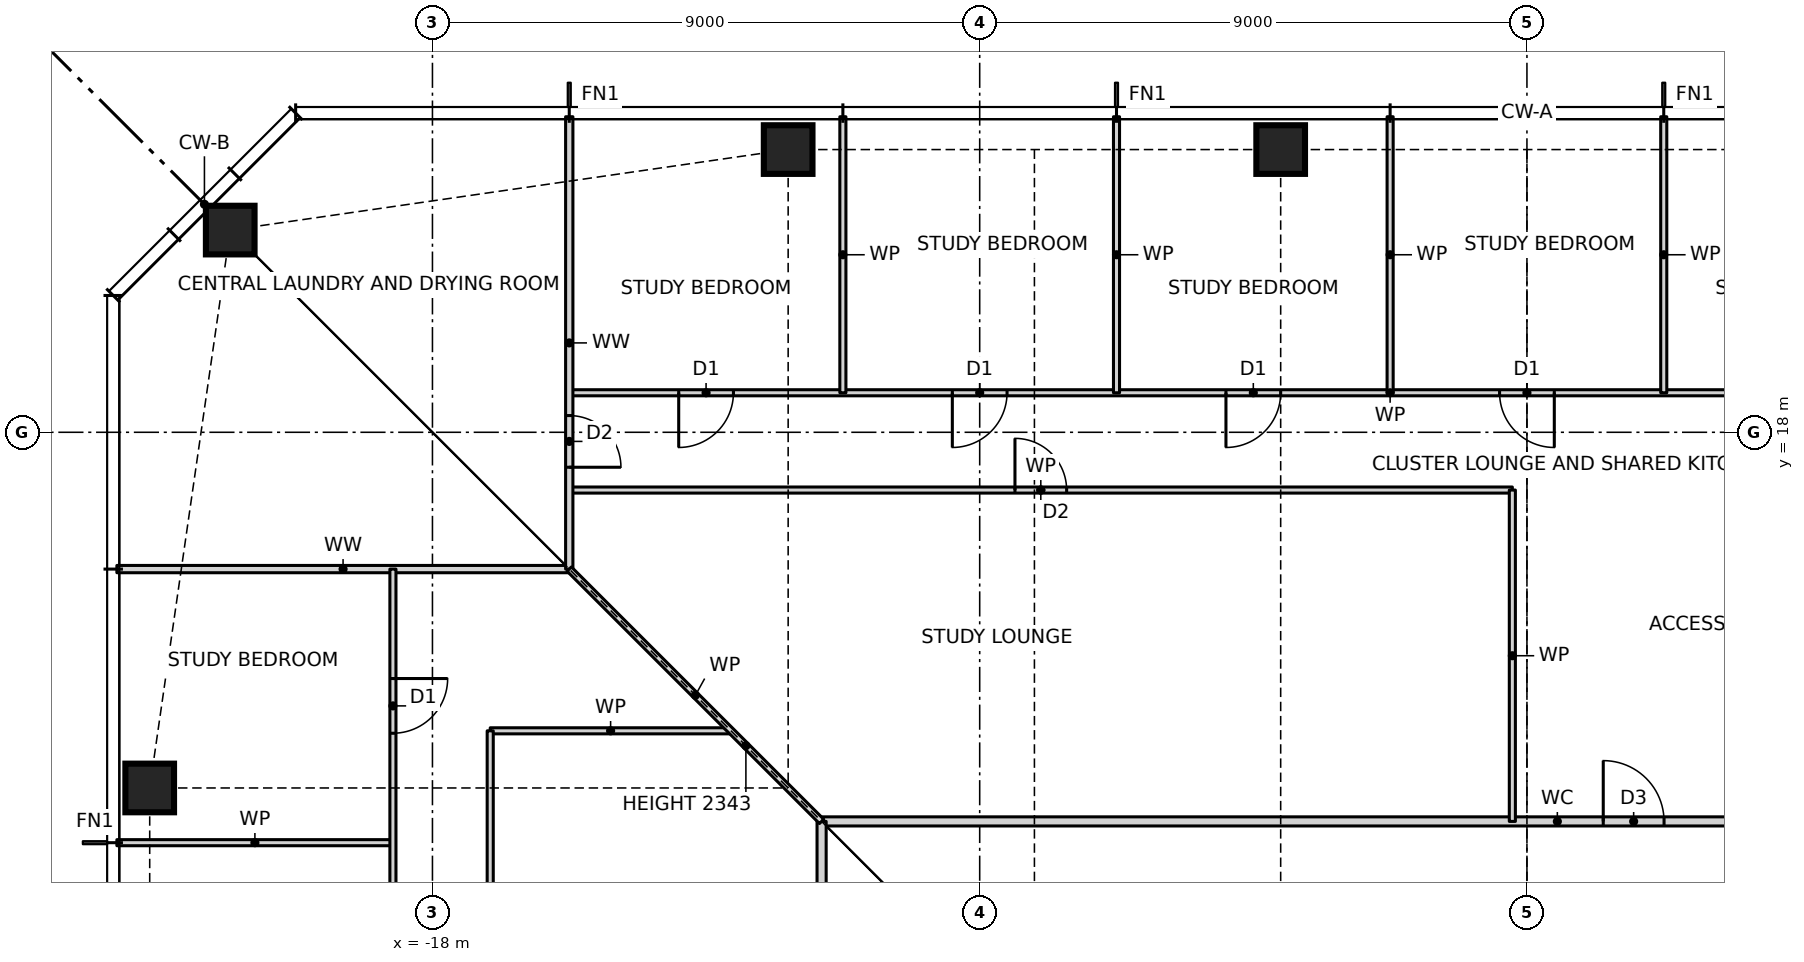
"""IFC4 building model, lengths in metres.
Left out: names, types, materials, properties, quantities, classifications, styles, units other than length and angle.
Written with IfcOpenShell. Run it as: python <this file> out.ifc"""

import sys

from ifc_helpers import new_model, si_unit, direction, frame, frame_2d, origin, origin_2d, place, context, subcontext, project, spatial, rectangle, hollow_rectangle, extrude, element, fill, save


model = new_model("IFC4")
c1 = context("Model", 3, precision=1e-05, world=origin(), true_north=direction((0.0, 1.0)))
c2 = subcontext(c1, "Body", "Model", "MODEL_VIEW")
j1 = project(units=[si_unit("LENGTHUNIT", "METRE"), si_unit("PLANEANGLEUNIT", "RADIAN")], contexts=[c1])
p1 = place(None, origin())
s1 = spatial("IfcSite", under=j1, at=p1, CompositionType="ELEMENT")
p2 = place(p1, origin())
s2 = spatial("IfcBuilding", under=s1, at=p2, CompositionType="ELEMENT")
p3 = place(p2, frame((0.0, 0.0, 32.5)))
s3 = spatial("IfcBuildingStorey", under=s2, at=p3, CompositionType="ELEMENT", Elevation=32.5)
for number, where, z_axis, x_axis in (
    (1, (-4.05, 22.65, 0.0), (0.0, 0.0, 1.0), (1.0, 0.0, 0.0)),
    (2, (-12.15, 22.65, 0.0), (0.0, 0.0, 1.0), (1.0, 0.0, 0.0)),
    (3, (-21.326, 21.326, 0.0), (0.0, 0.0, 1.0), (1.0, 0.0, 0.0)),
    (4, (-22.65, 12.15, 0.0), (0.0, 0.0, 1.0), (1.0, 0.0, 0.0)),
):
    element("IfcColumn", number, at=place(p3, frame(where, z_axis=z_axis, x_axis=x_axis)), inside=s3, PredefinedType="COLUMN", context=c2, shape_type="SweptSolid", body=[
        extrude(hollow_rectangle(XDim=0.8, YDim=0.8, WallThickness=0.09, at=origin_2d()), origin(), (0.0, 0.0, 1.0), 3.5),
    ])
p4 = place(p3, frame((-23.19, 11.25, 0.0), z_axis=(0.0, 0.0, 1.0), x_axis=(1.0, 0.0, 0.0)))
e5 = element("IfcWall", 5, at=p4, inside=s3, PredefinedType="PARTITIONING", context=c2, shape_type="SweptSolid", body=[
    extrude(rectangle(XDim=4.54, YDim=0.1, at=frame_2d((2.27, 0.0))), origin(), (0.0, 0.0, 1.0), 3.27),
])
p5 = place(p3, frame((-11.6, 11.6, 0.0), z_axis=(0.0, 0.0, 1.0), x_axis=(1.0, 0.0, 0.0)))
e6 = element("IfcWall", 6, at=p5, inside=s3, PredefinedType="PARTITIONING", context=c2, shape_type="SweptSolid", body=[
    extrude(rectangle(XDim=24.2, YDim=0.15, at=frame_2d((12.1, 0.0))), origin(), (0.0, 0.0, 1.0), 3.27),
])
p6 = place(p5, frame((12.855, 0.0, 0.0)))
e7 = element("IfcOpeningElement", 7, at=p6, cuts=e6, PredefinedType="OPENING", context=c2, shape_type="SweptSolid", body=[
    extrude(rectangle(XDim=1.0, YDim=2.1, at=frame_2d((0.5, 1.05))), frame((0.0, 0.085, 0.0), z_axis=(0.0, -1.0, 0.0), x_axis=(1.0, 0.0, 0.0)), (0.0, 0.0, 1.0), 0.17),
])
p7 = place(p3, frame((-17.05, 13.09, 0.0), z_axis=(0.0, 0.0, 1.0), x_axis=(1.0, 0.0, 0.0)))
e8 = element("IfcWall", 8, at=p7, inside=s3, PredefinedType="PARTITIONING", context=c2, shape_type="SweptSolid", body=[
    extrude(rectangle(XDim=3.96, YDim=0.1, at=frame_2d((1.98, 0.0))), origin(), (0.0, 0.0, 1.0), 3.27),
])
p8 = place(p3, frame((-23.19, 15.75, 0.0), z_axis=(0.0, 0.0, 1.0), x_axis=(1.0, 0.0, 0.0)))
e9 = element("IfcWall", 9, at=p8, inside=s3, PredefinedType="PARTITIONING", context=c2, shape_type="SweptSolid", body=[
    extrude(rectangle(XDim=7.44, YDim=0.12, at=frame_2d((3.72, 0.0))), origin(), (0.0, 0.0, 1.0), 3.27),
])
p9 = place(p3, frame((-15.75, 17.05, 0.0), z_axis=(0.0, 0.0, 1.0), x_axis=(1.0, 0.0, 0.0)))
e10 = element("IfcWall", 10, at=p9, inside=s3, PredefinedType="PARTITIONING", context=c2, shape_type="SweptSolid", body=[
    extrude(rectangle(XDim=15.51, YDim=0.1, at=frame_2d((7.755, 0.0))), origin(), (0.0, 0.0, 1.0), 3.27),
])
p10 = place(p9, frame((7.33, 0.0, 0.0)))
e11 = element("IfcOpeningElement", 11, at=p10, cuts=e10, PredefinedType="OPENING", context=c2, shape_type="SweptSolid", body=[
    extrude(rectangle(XDim=0.85, YDim=2.1, at=frame_2d((0.425, 1.05))), frame((0.0, 0.06, 0.0), z_axis=(0.0, -1.0, 0.0), x_axis=(1.0, 0.0, 0.0)), (0.0, 0.0, 1.0), 0.12),
])
p11 = place(p3, frame((-15.75, 18.65, 0.0), z_axis=(0.0, 0.0, 1.0), x_axis=(1.0, 0.0, 0.0)))
e12 = element("IfcWall", 12, at=p11, inside=s3, PredefinedType="PARTITIONING", context=c2, shape_type="SweptSolid", body=[
    extrude(rectangle(XDim=27.0, YDim=0.1, at=frame_2d((13.5, 0.0))), origin(), (0.0, 0.0, 1.0), 3.27),
])
p12 = place(p11, frame((24.3, 0.0, 0.0)))
e13 = element("IfcOpeningElement", 13, at=p12, cuts=e12, PredefinedType="OPENING", context=c2, shape_type="SweptSolid", body=[
    extrude(rectangle(XDim=0.9, YDim=2.1, at=frame_2d((0.45, 1.05))), frame((0.0, 0.06, 0.0), z_axis=(0.0, -1.0, 0.0), x_axis=(1.0, 0.0, 0.0)), (0.0, 0.0, 1.0), 0.12),
])
p13 = place(p11, frame((19.8, 0.0, 0.0)))
e14 = element("IfcOpeningElement", 14, at=p13, cuts=e12, PredefinedType="OPENING", context=c2, shape_type="SweptSolid", body=[
    extrude(rectangle(XDim=0.9, YDim=2.1, at=frame_2d((0.45, 1.05))), frame((0.0, 0.06, 0.0), z_axis=(0.0, -1.0, 0.0), x_axis=(1.0, 0.0, 0.0)), (0.0, 0.0, 1.0), 0.12),
])
p14 = place(p11, frame((15.3, 0.0, 0.0)))
e15 = element("IfcOpeningElement", 15, at=p14, cuts=e12, PredefinedType="OPENING", context=c2, shape_type="SweptSolid", body=[
    extrude(rectangle(XDim=0.9, YDim=2.1, at=frame_2d((0.45, 1.05))), frame((0.0, 0.06, 0.0), z_axis=(0.0, -1.0, 0.0), x_axis=(1.0, 0.0, 0.0)), (0.0, 0.0, 1.0), 0.12),
])
p15 = place(p11, frame((10.8, 0.0, 0.0)))
e16 = element("IfcOpeningElement", 16, at=p15, cuts=e12, PredefinedType="OPENING", context=c2, shape_type="SweptSolid", body=[
    extrude(rectangle(XDim=0.9, YDim=2.1, at=frame_2d((0.45, 1.05))), frame((0.0, 0.06, 0.0), z_axis=(0.0, -1.0, 0.0), x_axis=(1.0, 0.0, 0.0)), (0.0, 0.0, 1.0), 0.12),
])
p16 = place(p11, frame((6.3, 0.0, 0.0)))
e17 = element("IfcOpeningElement", 17, at=p16, cuts=e12, PredefinedType="OPENING", context=c2, shape_type="SweptSolid", body=[
    extrude(rectangle(XDim=0.9, YDim=2.1, at=frame_2d((0.45, 1.05))), frame((0.0, 0.06, 0.0), z_axis=(0.0, -1.0, 0.0), x_axis=(1.0, 0.0, 0.0)), (0.0, 0.0, 1.0), 0.12),
])
p17 = place(p11, frame((1.8, 0.0, 0.0)))
e18 = element("IfcOpeningElement", 18, at=p17, cuts=e12, PredefinedType="OPENING", context=c2, shape_type="SweptSolid", body=[
    extrude(rectangle(XDim=0.9, YDim=2.1, at=frame_2d((0.45, 1.05))), frame((0.0, 0.06, 0.0), z_axis=(0.0, -1.0, 0.0), x_axis=(1.0, 0.0, 0.0)), (0.0, 0.0, 1.0), 0.12),
])
p18 = place(p3, frame((2.25, 18.65, 0.0), z_axis=(0.0, 0.0, 1.0), x_axis=(0.0, 1.0, 0.0)))
e19 = element("IfcWall", 19, at=p18, inside=s3, PredefinedType="PARTITIONING", context=c2, shape_type="SweptSolid", body=[
    extrude(rectangle(XDim=4.54, YDim=0.1, at=frame_2d((2.27, 0.0))), origin(), (0.0, 0.0, 1.0), 3.27),
])
p19 = place(p3, frame((-0.24, 11.6, 0.0), z_axis=(0.0, 0.0, 1.0), x_axis=(0.0, 1.0, 0.0)))
e20 = element("IfcWall", 20, at=p19, inside=s3, PredefinedType="PARTITIONING", context=c2, shape_type="SweptSolid", body=[
    extrude(rectangle(XDim=5.45, YDim=0.1, at=frame_2d((2.725, 0.0))), origin(), (0.0, 0.0, 1.0), 3.27),
])
for number, where, z_axis, x_axis in (
    (21, (-2.25, 18.65, 0.0), (0.0, 0.0, 1.0), (0.0, 1.0, 0.0)),
    (22, (-6.75, 18.65, 0.0), (0.0, 0.0, 1.0), (0.0, 1.0, 0.0)),
    (23, (-11.25, 18.65, 0.0), (0.0, 0.0, 1.0), (0.0, 1.0, 0.0)),
):
    element("IfcWall", number, at=place(p3, frame(where, z_axis=z_axis, x_axis=x_axis)), inside=s3, PredefinedType="PARTITIONING", context=c2, shape_type="SweptSolid", body=[
        extrude(rectangle(XDim=4.54, YDim=0.1, at=frame_2d((2.27, 0.0))), origin(), (0.0, 0.0, 1.0), 3.27),
    ])
p20 = place(p3, frame((-11.6, -11.6, 0.0), z_axis=(0.0, 0.0, 1.0), x_axis=(0.0, 1.0, 0.0)))
e24 = element("IfcWall", 24, at=p20, inside=s3, PredefinedType="PARTITIONING", context=c2, shape_type="SweptSolid", body=[
    extrude(rectangle(XDim=23.2, YDim=0.15, at=frame_2d((11.6, 0.0))), origin(), (0.0, 0.0, 1.0), 3.27),
])
p21 = place(p20, frame((1.65, 0.0, 0.0)))
e25 = element("IfcOpeningElement", 25, at=p21, cuts=e24, PredefinedType="OPENING", context=c2, shape_type="SweptSolid", body=[
    extrude(rectangle(XDim=1.0, YDim=2.1, at=frame_2d((0.5, 1.05))), frame((0.0, 0.085, 0.0), z_axis=(0.0, -1.0, 0.0), x_axis=(1.0, 0.0, 0.0)), (0.0, 0.0, 1.0), 0.17),
])
p22 = place(p3, frame((-15.75, 15.75, 0.0), z_axis=(0.0, 0.0, 1.0), x_axis=(0.0, 1.0, 0.0)))
e26 = element("IfcWall", 26, at=p22, inside=s3, PredefinedType="PARTITIONING", context=c2, shape_type="SweptSolid", body=[
    extrude(rectangle(XDim=7.44, YDim=0.12, at=frame_2d((3.72, 0.0))), origin(), (0.0, 0.0, 1.0), 3.27),
])
p23 = place(p22, frame((1.675, 0.0, 0.0)))
e27 = element("IfcOpeningElement", 27, at=p23, cuts=e26, PredefinedType="OPENING", context=c2, shape_type="SweptSolid", body=[
    extrude(rectangle(XDim=0.85, YDim=2.1, at=frame_2d((0.425, 1.05))), frame((0.0, 0.07, 0.0), z_axis=(0.0, -1.0, 0.0), x_axis=(1.0, 0.0, 0.0)), (0.0, 0.0, 1.0), 0.14),
])
p24 = place(p3, frame((-17.05, -8.25, 0.0), z_axis=(0.0, 0.0, 1.0), x_axis=(0.0, 1.0, 0.0)))
e28 = element("IfcWall", 28, at=p24, inside=s3, PredefinedType="PARTITIONING", context=c2, shape_type="SweptSolid", body=[
    extrude(rectangle(XDim=21.34, YDim=0.1, at=frame_2d((10.67, 0.0))), origin(), (0.0, 0.0, 1.0), 3.27),
])
p25 = place(p24, frame((15.58, 0.0, 0.0)))
e29 = element("IfcOpeningElement", 29, at=p25, cuts=e28, PredefinedType="OPENING", context=c2, shape_type="SweptSolid", body=[
    extrude(rectangle(XDim=0.85, YDim=2.1, at=frame_2d((0.425, 1.05))), frame((0.0, 0.06, 0.0), z_axis=(0.0, -1.0, 0.0), x_axis=(1.0, 0.0, 0.0)), (0.0, 0.0, 1.0), 0.12),
])
p26 = place(p24, frame((4.91, 0.0, 0.0)))
e30 = element("IfcOpeningElement", 30, at=p26, cuts=e28, PredefinedType="OPENING", context=c2, shape_type="SweptSolid", body=[
    extrude(rectangle(XDim=0.85, YDim=2.1, at=frame_2d((0.425, 1.05))), frame((0.0, 0.06, 0.0), z_axis=(0.0, -1.0, 0.0), x_axis=(1.0, 0.0, 0.0)), (0.0, 0.0, 1.0), 0.12),
])
p27 = place(p3, frame((-18.65, -15.75, 0.0), z_axis=(0.0, 0.0, 1.0), x_axis=(0.0, 1.0, 0.0)))
e31 = element("IfcWall", 31, at=p27, inside=s3, PredefinedType="PARTITIONING", context=c2, shape_type="SweptSolid", body=[
    extrude(rectangle(XDim=31.5, YDim=0.1, at=frame_2d((15.75, 0.0))), origin(), (0.0, 0.0, 1.0), 3.27),
])
p28 = place(p27, frame((28.8, 0.0, 0.0)))
e32 = element("IfcOpeningElement", 32, at=p28, cuts=e31, PredefinedType="OPENING", context=c2, shape_type="SweptSolid", body=[
    extrude(rectangle(XDim=0.9, YDim=2.1, at=frame_2d((0.45, 1.05))), frame((0.0, 0.06, 0.0), z_axis=(0.0, -1.0, 0.0), x_axis=(1.0, 0.0, 0.0)), (0.0, 0.0, 1.0), 0.12),
])
p29 = place(p27, frame((24.3, 0.0, 0.0)))
e33 = element("IfcOpeningElement", 33, at=p29, cuts=e31, PredefinedType="OPENING", context=c2, shape_type="SweptSolid", body=[
    extrude(rectangle(XDim=0.9, YDim=2.1, at=frame_2d((0.45, 1.05))), frame((0.0, 0.06, 0.0), z_axis=(0.0, -1.0, 0.0), x_axis=(1.0, 0.0, 0.0)), (0.0, 0.0, 1.0), 0.12),
])
p30 = place(p27, frame((19.8, 0.0, 0.0)))
e34 = element("IfcOpeningElement", 34, at=p30, cuts=e31, PredefinedType="OPENING", context=c2, shape_type="SweptSolid", body=[
    extrude(rectangle(XDim=0.9, YDim=2.1, at=frame_2d((0.45, 1.05))), frame((0.0, 0.06, 0.0), z_axis=(0.0, -1.0, 0.0), x_axis=(1.0, 0.0, 0.0)), (0.0, 0.0, 1.0), 0.12),
])
p31 = place(p27, frame((15.3, 0.0, 0.0)))
e35 = element("IfcOpeningElement", 35, at=p31, cuts=e31, PredefinedType="OPENING", context=c2, shape_type="SweptSolid", body=[
    extrude(rectangle(XDim=0.9, YDim=2.1, at=frame_2d((0.45, 1.05))), frame((0.0, 0.06, 0.0), z_axis=(0.0, -1.0, 0.0), x_axis=(1.0, 0.0, 0.0)), (0.0, 0.0, 1.0), 0.12),
])
p32 = place(p27, frame((10.8, 0.0, 0.0)))
e36 = element("IfcOpeningElement", 36, at=p32, cuts=e31, PredefinedType="OPENING", context=c2, shape_type="SweptSolid", body=[
    extrude(rectangle(XDim=0.9, YDim=2.1, at=frame_2d((0.45, 1.05))), frame((0.0, 0.06, 0.0), z_axis=(0.0, -1.0, 0.0), x_axis=(1.0, 0.0, 0.0)), (0.0, 0.0, 1.0), 0.12),
])
p33 = place(p27, frame((6.3, 0.0, 0.0)))
e37 = element("IfcOpeningElement", 37, at=p33, cuts=e31, PredefinedType="OPENING", context=c2, shape_type="SweptSolid", body=[
    extrude(rectangle(XDim=0.9, YDim=2.1, at=frame_2d((0.45, 1.05))), frame((0.0, 0.06, 0.0), z_axis=(0.0, -1.0, 0.0), x_axis=(1.0, 0.0, 0.0)), (0.0, 0.0, 1.0), 0.12),
])
p34 = place(p27, frame((1.8, 0.0, 0.0)))
e38 = element("IfcOpeningElement", 38, at=p34, cuts=e31, PredefinedType="OPENING", context=c2, shape_type="SweptSolid", body=[
    extrude(rectangle(XDim=0.9, YDim=2.1, at=frame_2d((0.45, 1.05))), frame((0.0, 0.06, 0.0), z_axis=(0.0, -1.0, 0.0), x_axis=(1.0, 0.0, 0.0)), (0.0, 0.0, 1.0), 0.12),
])
p35 = place(p3, frame((-11.6, 11.6, 0.0), z_axis=(0.0, 0.0, 1.0), x_axis=(-0.707106781187, 0.707106781187, 0.0)))
e39 = element("IfcWall", 39, at=p35, inside=s3, PredefinedType="PARTITIONING", context=c2, shape_type="SweptSolid", body=[
    extrude(rectangle(XDim=5.869, YDim=0.1, at=frame_2d((2.935, 0.0))), origin(), (0.0, 0.0, 1.0), 2.343),
])
p36 = place(p14, frame((0.9, 0.0, 0.0), z_axis=(0.0, 0.0, 1.0), x_axis=(-1.0, 0.0, 0.0)))
e40 = element("IfcDoor", 40, at=p36, inside=s3, OperationType="SINGLE_SWING_LEFT", PredefinedType="DOOR", context=c2, shape_type="SweptSolid", body=[
    extrude(rectangle(XDim=0.9, YDim=2.1, at=frame_2d((0.45, 1.05))), frame((0.0, 0.025, 0.0), z_axis=(0.0, -1.0, 0.0), x_axis=(1.0, 0.0, 0.0)), (0.0, 0.0, 1.0), 0.05),
])
fill(e15, e40)
p37 = place(p15, frame((0.9, 0.0, 0.0), z_axis=(0.0, 0.0, 1.0), x_axis=(-1.0, 0.0, 0.0)))
e41 = element("IfcDoor", 41, at=p37, inside=s3, OperationType="SINGLE_SWING_RIGHT", PredefinedType="DOOR", context=c2, shape_type="SweptSolid", body=[
    extrude(rectangle(XDim=0.9, YDim=2.1, at=frame_2d((0.45, 1.05))), frame((0.0, 0.025, 0.0), z_axis=(0.0, -1.0, 0.0), x_axis=(1.0, 0.0, 0.0)), (0.0, 0.0, 1.0), 0.05),
])
fill(e16, e41)
p38 = place(p16, frame((0.9, 0.0, 0.0), z_axis=(0.0, 0.0, 1.0), x_axis=(-1.0, 0.0, 0.0)))
e42 = element("IfcDoor", 42, at=p38, inside=s3, OperationType="SINGLE_SWING_RIGHT", PredefinedType="DOOR", context=c2, shape_type="SweptSolid", body=[
    extrude(rectangle(XDim=0.9, YDim=2.1, at=frame_2d((0.45, 1.05))), frame((0.0, 0.025, 0.0), z_axis=(0.0, -1.0, 0.0), x_axis=(1.0, 0.0, 0.0)), (0.0, 0.0, 1.0), 0.05),
])
fill(e17, e42)
p39 = place(p17, frame((0.9, 0.0, 0.0), z_axis=(0.0, 0.0, 1.0), x_axis=(-1.0, 0.0, 0.0)))
e43 = element("IfcDoor", 43, at=p39, inside=s3, OperationType="SINGLE_SWING_RIGHT", PredefinedType="DOOR", context=c2, shape_type="SweptSolid", body=[
    extrude(rectangle(XDim=0.9, YDim=2.1, at=frame_2d((0.45, 1.05))), frame((0.0, 0.025, 0.0), z_axis=(0.0, -1.0, 0.0), x_axis=(1.0, 0.0, 0.0)), (0.0, 0.0, 1.0), 0.05),
])
fill(e18, e43)
p40 = place(p6, origin())
e44 = element("IfcDoor", 44, at=p40, inside=s3, OperationType="SINGLE_SWING_LEFT", PredefinedType="DOOR", context=c2, shape_type="SweptSolid", body=[
    extrude(rectangle(XDim=1.0, YDim=2.1, at=frame_2d((0.5, 1.05))), frame((0.0, 0.025, 0.0), z_axis=(0.0, -1.0, 0.0), x_axis=(1.0, 0.0, 0.0)), (0.0, 0.0, 1.0), 0.05),
])
fill(e7, e44)
p41 = place(p10, origin())
e45 = element("IfcDoor", 45, at=p41, inside=s3, OperationType="SINGLE_SWING_LEFT", PredefinedType="DOOR", context=c2, shape_type="SweptSolid", body=[
    extrude(rectangle(XDim=0.85, YDim=2.1, at=frame_2d((0.425, 1.05))), frame((0.0, 0.025, 0.0), z_axis=(0.0, -1.0, 0.0), x_axis=(1.0, 0.0, 0.0)), (0.0, 0.0, 1.0), 0.05),
])
fill(e11, e45)
p42 = place(p28, frame((0.9, 0.0, 0.0), z_axis=(0.0, 0.0, 1.0), x_axis=(-1.0, 0.0, 0.0)))
e46 = element("IfcDoor", 46, at=p42, inside=s3, OperationType="SINGLE_SWING_LEFT", PredefinedType="DOOR", context=c2, shape_type="SweptSolid", body=[
    extrude(rectangle(XDim=0.9, YDim=2.1, at=frame_2d((0.45, 1.05))), frame((0.0, 0.025, 0.0), z_axis=(0.0, -1.0, 0.0), x_axis=(1.0, 0.0, 0.0)), (0.0, 0.0, 1.0), 0.05),
])
fill(e32, e46)
p43 = place(p23, frame((0.85, 0.0, 0.0), z_axis=(0.0, 0.0, 1.0), x_axis=(-1.0, 0.0, 0.0)))
e47 = element("IfcDoor", 47, at=p43, inside=s3, OperationType="SINGLE_SWING_RIGHT", PredefinedType="DOOR", context=c2, shape_type="SweptSolid", body=[
    extrude(rectangle(XDim=0.85, YDim=2.1, at=frame_2d((0.425, 1.05))), frame((0.0, 0.025, 0.0), z_axis=(0.0, -1.0, 0.0), x_axis=(1.0, 0.0, 0.0)), (0.0, 0.0, 1.0), 0.05),
])
fill(e27, e47)
save(model, sys.argv[1])
